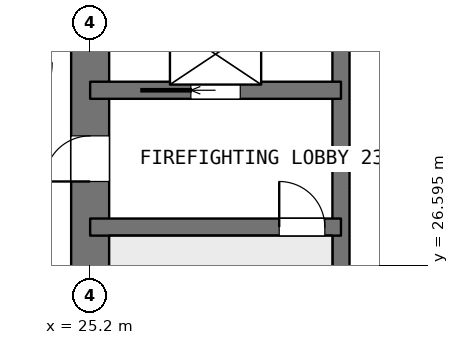
"""IFC4 building model, lengths in metres.
Left out: names, types, materials, properties, quantities, classifications, styles, units other than length and angle.
Written with IfcOpenShell. Run it as: python <this file> out.ifc"""

import sys

from ifc_helpers import new_model, si_unit, direction, frame, frame_2d, origin, place, context, subcontext, project, spatial, rectangle, extrude, element, fill, save


model = new_model("IFC4")
c1 = context("Model", 3, precision=1e-05, world=origin(), true_north=direction((0.0, 1.0)))
c2 = subcontext(c1, "Body", "Model", "MODEL_VIEW")
j1 = project(units=[si_unit("LENGTHUNIT", "METRE"), si_unit("PLANEANGLEUNIT", "RADIAN")], contexts=[c1])
p1 = place(None, origin())
s1 = spatial("IfcSite", under=j1, at=p1, CompositionType="ELEMENT")
p2 = place(p1, origin())
s2 = spatial("IfcBuilding", under=s1, at=p2, CompositionType="ELEMENT")
p3 = place(p2, frame((0.0, 0.0, 217.7)))
s3 = spatial("IfcBuildingStorey", under=s2, at=p3, CompositionType="ELEMENT", Elevation=217.7)
p4 = place(p3, frame((25.2, 21.0, 0.0), z_axis=(0.0, 0.0, 1.0), x_axis=(0.0, 1.0, 0.0)))
e1 = element("IfcWall", 1, at=p4, inside=s3, PredefinedType="SHEAR", context=c2, shape_type="SweptSolid", body=[
    extrude(rectangle(XDim=25.2, YDim=1.0, at=frame_2d((12.6, 0.0))), origin(), (0.0, 0.0, 1.0), 3.75),
])
p5 = place(p4, frame((7.8, 0.0, 0.0)))
e2 = element("IfcOpeningElement", 2, at=p5, cuts=e1, PredefinedType="OPENING", context=c2, shape_type="SweptSolid", body=[
    extrude(rectangle(XDim=1.2, YDim=2.1, at=frame_2d((0.6, 1.05))), frame((0.0, 0.51, 0.0), z_axis=(0.0, -1.0, 0.0), x_axis=(1.0, 0.0, 0.0)), (0.0, 0.0, 1.0), 1.02),
])
p6 = place(p4, frame((14.25, 0.0, 0.0)))
e3 = element("IfcOpeningElement", 3, at=p6, cuts=e1, PredefinedType="OPENING", context=c2, shape_type="SweptSolid", body=[
    extrude(rectangle(XDim=0.9, YDim=2.1, at=frame_2d((0.45, 1.05))), frame((0.0, 0.51, 0.0), z_axis=(0.0, -1.0, 0.0), x_axis=(1.0, 0.0, 0.0)), (0.0, 0.0, 1.0), 1.02),
])
p7 = place(p4, frame((16.85, 0.0, 0.0)))
e4 = element("IfcOpeningElement", 4, at=p7, cuts=e1, PredefinedType="OPENING", context=c2, shape_type="SweptSolid", body=[
    extrude(rectangle(XDim=0.9, YDim=2.1, at=frame_2d((0.45, 1.05))), frame((0.0, 0.51, 0.0), z_axis=(0.0, -1.0, 0.0), x_axis=(1.0, 0.0, 0.0)), (0.0, 0.0, 1.0), 1.02),
])
p8 = place(p4, frame((19.025, 0.0, 0.0)))
e5 = element("IfcOpeningElement", 5, at=p8, cuts=e1, PredefinedType="OPENING", context=c2, shape_type="SweptSolid", body=[
    extrude(rectangle(XDim=1.2, YDim=2.1, at=frame_2d((0.6, 1.05))), frame((0.0, 0.51, 0.0), z_axis=(0.0, -1.0, 0.0), x_axis=(1.0, 0.0, 0.0)), (0.0, 0.0, 1.0), 1.02),
])
p9 = place(p3, frame((31.8, 21.0, 0.0), z_axis=(0.0, 0.0, 1.0), x_axis=(0.0, 1.0, 0.0)))
e6 = element("IfcWall", 6, at=p9, inside=s3, PredefinedType="SHEAR", context=c2, shape_type="SweptSolid", body=[
    extrude(rectangle(XDim=25.2, YDim=0.45, at=frame_2d((12.6, 0.0))), origin(), (0.0, 0.0, 1.0), 3.75),
])
p10 = place(p3, frame((25.2, 27.6, 0.0), z_axis=(0.0, 0.0, 1.0), x_axis=(1.0, 0.0, 0.0)))
e7 = element("IfcWall", 7, at=p10, inside=s3, PredefinedType="SHEAR", context=c2, shape_type="SweptSolid", body=[
    extrude(rectangle(XDim=6.6, YDim=0.45, at=frame_2d((3.3, 0.0))), origin(), (0.0, 0.0, 1.0), 3.75),
])
p11 = place(p10, frame((4.975, 0.0, 0.0)))
e8 = element("IfcOpeningElement", 8, at=p11, cuts=e7, PredefinedType="OPENING", context=c2, shape_type="SweptSolid", body=[
    extrude(rectangle(XDim=1.2, YDim=2.1, at=frame_2d((0.6, 1.05))), frame((0.0, 0.235, 0.0), z_axis=(0.0, -1.0, 0.0), x_axis=(1.0, 0.0, 0.0)), (0.0, 0.0, 1.0), 0.47),
])
p12 = place(p3, frame((25.2, 31.2, 0.0), z_axis=(0.0, 0.0, 1.0), x_axis=(1.0, 0.0, 0.0)))
e9 = element("IfcWall", 9, at=p12, inside=s3, PredefinedType="SHEAR", context=c2, shape_type="SweptSolid", body=[
    extrude(rectangle(XDim=6.6, YDim=0.45, at=frame_2d((3.3, 0.0))), origin(), (0.0, 0.0, 1.0), 3.75),
])
p13 = place(p12, frame((2.65, 0.0, 0.0)))
e10 = element("IfcOpeningElement", 10, at=p13, cuts=e9, PredefinedType="OPENING", context=c2, shape_type="SweptSolid", body=[
    extrude(rectangle(XDim=1.3, YDim=2.1, at=frame_2d((0.65, 1.05))), frame((0.0, 0.235, 0.0), z_axis=(0.0, -1.0, 0.0), x_axis=(1.0, 0.0, 0.0)), (0.0, 0.0, 1.0), 0.47),
])
p14 = place(p3, frame((32.025, 29.4, 0.0), z_axis=(0.0, 0.0, 1.0), x_axis=(1.0, 0.0, 0.0)))
e11 = element("IfcWall", 11, at=p14, inside=s3, PredefinedType="PARTITIONING", context=c2, shape_type="SweptSolid", body=[
    extrude(rectangle(XDim=3.35, YDim=0.2, at=frame_2d((1.675, 0.0))), origin(), (0.0, 0.0, 1.0), 3.5),
])
p15 = place(p5, origin())
e12 = element("IfcDoor", 12, at=p15, inside=s3, OperationType="SINGLE_SWING_LEFT", PredefinedType="DOOR", context=c2, shape_type="SweptSolid", body=[
    extrude(rectangle(XDim=1.2, YDim=2.1, at=frame_2d((0.6, 1.05))), frame((0.0, 0.025, 0.0), z_axis=(0.0, -1.0, 0.0), x_axis=(1.0, 0.0, 0.0)), (0.0, 0.0, 1.0), 0.05),
])
fill(e2, e12)
p16 = place(p13, origin())
e13 = element("IfcDoor", 13, at=p16, inside=s3, OperationType="SLIDING_TO_LEFT", PredefinedType="USERDEFINED", context=c2, shape_type="SweptSolid", body=[
    extrude(rectangle(XDim=1.3, YDim=2.1, at=frame_2d((0.65, 1.05))), frame((0.0, 0.025, 0.0), z_axis=(0.0, -1.0, 0.0), x_axis=(1.0, 0.0, 0.0)), (0.0, 0.0, 1.0), 0.05),
])
fill(e10, e13)
p17 = place(p11, origin())
e14 = element("IfcDoor", 14, at=p17, inside=s3, OperationType="SINGLE_SWING_RIGHT", PredefinedType="DOOR", context=c2, shape_type="SweptSolid", body=[
    extrude(rectangle(XDim=1.2, YDim=2.1, at=frame_2d((0.6, 1.05))), frame((0.0, 0.025, 0.0), z_axis=(0.0, -1.0, 0.0), x_axis=(1.0, 0.0, 0.0)), (0.0, 0.0, 1.0), 0.05),
])
fill(e8, e14)
save(model, sys.argv[1])
